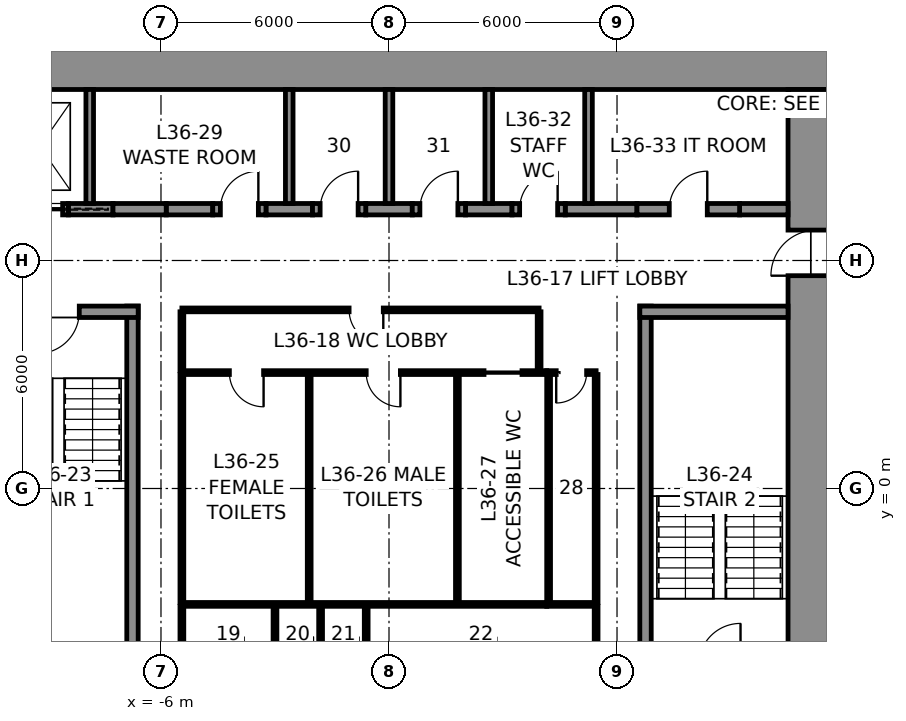
"""IFC4 building model, lengths in metres.
Left out: names, types, materials, properties, quantities, classifications, styles, units other than length and angle.
Written with IfcOpenShell. Run it as: python <this file> out.ifc"""

import sys

from ifc_helpers import new_model, si_unit, direction, frame, frame_2d, origin, place, context, subcontext, project, spatial, rectangle, extrude, element, fill, save


model = new_model("IFC4")
c1 = context("Model", 3, precision=1e-05, world=origin(), true_north=direction((0.0, 1.0)))
c2 = subcontext(c1, "Body", "Model", "MODEL_VIEW")
j1 = project(units=[si_unit("LENGTHUNIT", "METRE"), si_unit("PLANEANGLEUNIT", "RADIAN")], contexts=[c1])
p1 = place(None, origin())
s1 = spatial("IfcSite", under=j1, at=p1, CompositionType="ELEMENT")
p2 = place(p1, origin())
s2 = spatial("IfcBuilding", under=s1, at=p2, CompositionType="ELEMENT")
p3 = place(p2, frame((0.0, 0.0, 171.8)))
s3 = spatial("IfcBuildingStorey", under=s2, at=p3, CompositionType="ELEMENT", Elevation=171.8)
p4 = place(p3, frame((-12.0, 11.25, 0.0), z_axis=(0.0, 0.0, 1.0), x_axis=(1.0, 0.0, 0.0)))
e1 = element("IfcWall", 1, at=p4, inside=s3, PredefinedType="SHEAR", context=c2, shape_type="SweptSolid", body=[
    extrude(rectangle(XDim=24.0, YDim=1.5, at=frame_2d((12.0, 0.0))), origin(), (0.0, 0.0, 1.0), 4.0),
])
p5 = place(p3, frame((11.25, 10.5, 0.0), z_axis=(0.0, 0.0, 1.0), x_axis=(0.0, -1.0, 0.0)))
e2 = element("IfcWall", 2, at=p5, inside=s3, PredefinedType="SHEAR", context=c2, shape_type="SweptSolid", body=[
    extrude(rectangle(XDim=21.0, YDim=1.5, at=frame_2d((10.5, 0.0))), origin(), (0.0, 0.0, 1.0), 4.0),
])
p6 = place(p5, frame((3.7, 0.0, 0.0)))
e3 = element("IfcOpeningElement", 3, at=p6, cuts=e2, PredefinedType="OPENING", context=c2, shape_type="SweptSolid", body=[
    extrude(rectangle(XDim=1.2, YDim=2.3, at=frame_2d((0.6, 1.15))), frame((0.0, 0.76, 0.0), z_axis=(0.0, -1.0, 0.0), x_axis=(1.0, 0.0, 0.0)), (0.0, 0.0, 1.0), 1.52),
])
p7 = place(p5, frame((16.1, 0.0, 0.0)))
e4 = element("IfcOpeningElement", 4, at=p7, cuts=e2, PredefinedType="OPENING", context=c2, shape_type="SweptSolid", body=[
    extrude(rectangle(XDim=1.2, YDim=2.3, at=frame_2d((0.6, 1.15))), frame((0.0, 0.76, 0.0), z_axis=(0.0, -1.0, 0.0), x_axis=(1.0, 0.0, 0.0)), (0.0, 0.0, 1.0), 1.52),
])
p8 = place(p3, frame((-8.438, 7.35, 0.0), z_axis=(0.0, 0.0, 1.0), x_axis=(1.0, 0.0, 0.0)))
e5 = element("IfcWall", 5, at=p8, inside=s3, PredefinedType="SHEAR", context=c2, shape_type="SweptSolid", body=[
    extrude(rectangle(XDim=1.175, YDim=0.3, at=frame_2d((0.587, 0.0))), origin(), (0.0, 0.0, 1.0), 4.0),
])
for number, where, z_axis, x_axis in (
    (6, (-5.863, 7.35, 0.0), (0.0, 0.0, 1.0), (1.0, 0.0, 0.0)),
    (7, (-3.238, 7.35, 0.0), (0.0, 0.0, 1.0), (1.0, 0.0, 0.0)),
    (8, (-0.613, 7.35, 0.0), (0.0, 0.0, 1.0), (1.0, 0.0, 0.0)),
    (9, (2.012, 7.35, 0.0), (0.0, 0.0, 1.0), (1.0, 0.0, 0.0)),
):
    element("IfcWall", number, at=place(p3, frame(where, z_axis=z_axis, x_axis=x_axis)), inside=s3, PredefinedType="SHEAR", context=c2, shape_type="SweptSolid", body=[
        extrude(rectangle(XDim=1.225, YDim=0.3, at=frame_2d((0.613, 0.0))), origin(), (0.0, 0.0, 1.0), 4.0),
    ])
p9 = place(p3, frame((4.637, 7.35, 0.0), z_axis=(0.0, 0.0, 1.0), x_axis=(1.0, 0.0, 0.0)))
e10 = element("IfcWall", 10, at=p9, inside=s3, PredefinedType="SHEAR", context=c2, shape_type="SweptSolid", body=[
    extrude(rectangle(XDim=1.887, YDim=0.3, at=frame_2d((0.944, 0.0))), origin(), (0.0, 0.0, 1.0), 4.0),
])
p10 = place(p3, frame((9.225, 7.35, 0.0), z_axis=(0.0, 0.0, 1.0), x_axis=(1.0, 0.0, 0.0)))
e11 = element("IfcWall", 11, at=p10, inside=s3, PredefinedType="SHEAR", context=c2, shape_type="SweptSolid", body=[
    extrude(rectangle(XDim=1.275, YDim=0.3, at=frame_2d((0.637, 0.0))), origin(), (0.0, 0.0, 1.0), 4.0),
])
p11 = place(p3, frame((-9.938, 7.35, 0.0), z_axis=(0.0, 0.0, 1.0), x_axis=(1.0, 0.0, 0.0)))
e12 = element("IfcWall", 12, at=p11, inside=s3, PredefinedType="PARTITIONING", context=c2, shape_type="SweptSolid", body=[
    extrude(rectangle(XDim=1.5, YDim=0.3, at=frame_2d((0.75, 0.0))), origin(), (0.0, 0.0, 1.0), 4.0),
])
p12 = place(p11, frame((0.15, 0.0, 0.0)))
e13 = element("IfcOpeningElement", 13, at=p12, cuts=e12, PredefinedType="OPENING", context=c2, shape_type="SweptSolid", body=[
    extrude(rectangle(XDim=1.2, YDim=2.3, at=frame_2d((0.6, 1.15))), frame((0.0, 0.16, 0.0), z_axis=(0.0, -1.0, 0.0), x_axis=(1.0, 0.0, 0.0)), (0.0, 0.0, 1.0), 0.32),
])
p13 = place(p3, frame((-7.262, 7.35, 0.0), z_axis=(0.0, 0.0, 1.0), x_axis=(1.0, 0.0, 0.0)))
e14 = element("IfcWall", 14, at=p13, inside=s3, PredefinedType="PARTITIONING", context=c2, shape_type="SweptSolid", body=[
    extrude(rectangle(XDim=1.4, YDim=0.3, at=frame_2d((0.7, 0.0))), origin(), (0.0, 0.0, 1.0), 4.0),
])
p14 = place(p3, frame((-4.637, 7.35, 0.0), z_axis=(0.0, 0.0, 1.0), x_axis=(1.0, 0.0, 0.0)))
e15 = element("IfcWall", 15, at=p14, inside=s3, PredefinedType="PARTITIONING", context=c2, shape_type="SweptSolid", body=[
    extrude(rectangle(XDim=1.4, YDim=0.3, at=frame_2d((0.7, 0.0))), origin(), (0.0, 0.0, 1.0), 4.0),
])
p15 = place(p14, frame((0.2, 0.0, 0.0)))
e16 = element("IfcOpeningElement", 16, at=p15, cuts=e15, PredefinedType="OPENING", context=c2, shape_type="SweptSolid", body=[
    extrude(rectangle(XDim=1.0, YDim=2.3, at=frame_2d((0.5, 1.15))), frame((0.0, 0.16, 0.0), z_axis=(0.0, -1.0, 0.0), x_axis=(1.0, 0.0, 0.0)), (0.0, 0.0, 1.0), 0.32),
])
p16 = place(p3, frame((-2.012, 7.35, 0.0), z_axis=(0.0, 0.0, 1.0), x_axis=(1.0, 0.0, 0.0)))
e17 = element("IfcWall", 17, at=p16, inside=s3, PredefinedType="PARTITIONING", context=c2, shape_type="SweptSolid", body=[
    extrude(rectangle(XDim=1.4, YDim=0.3, at=frame_2d((0.7, 0.0))), origin(), (0.0, 0.0, 1.0), 4.0),
])
p17 = place(p16, frame((0.2, 0.0, 0.0)))
e18 = element("IfcOpeningElement", 18, at=p17, cuts=e17, PredefinedType="OPENING", context=c2, shape_type="SweptSolid", body=[
    extrude(rectangle(XDim=1.0, YDim=2.3, at=frame_2d((0.5, 1.15))), frame((0.0, 0.16, 0.0), z_axis=(0.0, -1.0, 0.0), x_axis=(1.0, 0.0, 0.0)), (0.0, 0.0, 1.0), 0.32),
])
p18 = place(p3, frame((0.613, 7.35, 0.0), z_axis=(0.0, 0.0, 1.0), x_axis=(1.0, 0.0, 0.0)))
e19 = element("IfcWall", 19, at=p18, inside=s3, PredefinedType="PARTITIONING", context=c2, shape_type="SweptSolid", body=[
    extrude(rectangle(XDim=1.4, YDim=0.3, at=frame_2d((0.7, 0.0))), origin(), (0.0, 0.0, 1.0), 4.0),
])
p19 = place(p18, frame((0.2, 0.0, 0.0)))
e20 = element("IfcOpeningElement", 20, at=p19, cuts=e19, PredefinedType="OPENING", context=c2, shape_type="SweptSolid", body=[
    extrude(rectangle(XDim=1.0, YDim=2.3, at=frame_2d((0.5, 1.15))), frame((0.0, 0.16, 0.0), z_axis=(0.0, -1.0, 0.0), x_axis=(1.0, 0.0, 0.0)), (0.0, 0.0, 1.0), 0.32),
])
p20 = place(p3, frame((3.238, 7.35, 0.0), z_axis=(0.0, 0.0, 1.0), x_axis=(1.0, 0.0, 0.0)))
e21 = element("IfcWall", 21, at=p20, inside=s3, PredefinedType="PARTITIONING", context=c2, shape_type="SweptSolid", body=[
    extrude(rectangle(XDim=1.4, YDim=0.3, at=frame_2d((0.7, 0.0))), origin(), (0.0, 0.0, 1.0), 4.0),
])
p21 = place(p20, frame((0.2, 0.0, 0.0)))
e22 = element("IfcOpeningElement", 22, at=p21, cuts=e21, PredefinedType="OPENING", context=c2, shape_type="SweptSolid", body=[
    extrude(rectangle(XDim=1.0, YDim=2.3, at=frame_2d((0.5, 1.15))), frame((0.0, 0.16, 0.0), z_axis=(0.0, -1.0, 0.0), x_axis=(1.0, 0.0, 0.0)), (0.0, 0.0, 1.0), 0.32),
])
p22 = place(p3, frame((6.525, 7.35, 0.0), z_axis=(0.0, 0.0, 1.0), x_axis=(1.0, 0.0, 0.0)))
e23 = element("IfcWall", 23, at=p22, inside=s3, PredefinedType="PARTITIONING", context=c2, shape_type="SweptSolid", body=[
    extrude(rectangle(XDim=2.7, YDim=0.3, at=frame_2d((1.35, 0.0))), origin(), (0.0, 0.0, 1.0), 4.0),
])
p23 = place(p22, frame((0.85, 0.0, 0.0)))
e24 = element("IfcOpeningElement", 24, at=p23, cuts=e23, PredefinedType="OPENING", context=c2, shape_type="SweptSolid", body=[
    extrude(rectangle(XDim=1.0, YDim=2.3, at=frame_2d((0.5, 1.15))), frame((0.0, 0.16, 0.0), z_axis=(0.0, -1.0, 0.0), x_axis=(1.0, 0.0, 0.0)), (0.0, 0.0, 1.0), 0.32),
])
for number, where, z_axis, x_axis in (
    (25, (-7.875, 7.5, 0.0), (0.0, 0.0, 1.0), (0.0, 1.0, 0.0)),
    (26, (-2.625, 7.5, 0.0), (0.0, 0.0, 1.0), (0.0, 1.0, 0.0)),
    (27, (0.0, 7.5, 0.0), (0.0, 0.0, 1.0), (0.0, 1.0, 0.0)),
    (28, (2.625, 7.5, 0.0), (0.0, 0.0, 1.0), (0.0, 1.0, 0.0)),
    (29, (5.25, 7.5, 0.0), (0.0, 0.0, 1.0), (0.0, 1.0, 0.0)),
):
    element("IfcWall", number, at=place(p3, frame(where, z_axis=z_axis, x_axis=x_axis)), inside=s3, PredefinedType="PARTITIONING", context=c2, shape_type="SweptSolid", body=[
        extrude(rectangle(XDim=3.0, YDim=0.2, at=frame_2d((1.5, 0.0))), origin(), (0.0, 0.0, 1.0), 4.0),
    ])
p24 = place(p3, frame((-6.75, -4.8, 0.0), z_axis=(0.0, 0.0, 1.0), x_axis=(0.0, 1.0, 0.0)))
e30 = element("IfcWall", 30, at=p24, inside=s3, PredefinedType="SOLIDWALL", context=c2, shape_type="SweptSolid", body=[
    extrude(rectangle(XDim=9.6, YDim=0.3, at=frame_2d((4.8, 0.0))), origin(), (0.0, 0.0, 1.0), 3.75),
])
p25 = place(p3, frame((-10.5, 4.65, 0.0), z_axis=(0.0, 0.0, 1.0), x_axis=(1.0, 0.0, 0.0)))
e31 = element("IfcWall", 31, at=p25, inside=s3, PredefinedType="SOLIDWALL", context=c2, shape_type="SweptSolid", body=[
    extrude(rectangle(XDim=3.9, YDim=0.3, at=frame_2d((1.95, 0.0))), origin(), (0.0, 0.0, 1.0), 3.75),
])
p26 = place(p25, frame((1.25, 0.0, 0.0)))
e32 = element("IfcOpeningElement", 32, at=p26, cuts=e31, PredefinedType="OPENING", context=c2, shape_type="SweptSolid", body=[
    extrude(rectangle(XDim=1.1, YDim=2.3, at=frame_2d((0.55, 1.15))), frame((0.0, 0.16, 0.0), z_axis=(0.0, -1.0, 0.0), x_axis=(1.0, 0.0, 0.0)), (0.0, 0.0, 1.0), 0.32),
])
p27 = place(p3, frame((6.75, -4.8, 0.0), z_axis=(0.0, 0.0, 1.0), x_axis=(0.0, 1.0, 0.0)))
e33 = element("IfcWall", 33, at=p27, inside=s3, PredefinedType="SOLIDWALL", context=c2, shape_type="SweptSolid", body=[
    extrude(rectangle(XDim=9.6, YDim=0.3, at=frame_2d((4.8, 0.0))), origin(), (0.0, 0.0, 1.0), 3.75),
])
p28 = place(p3, frame((6.6, 4.65, 0.0), z_axis=(0.0, 0.0, 1.0), x_axis=(1.0, 0.0, 0.0)))
e34 = element("IfcWall", 34, at=p28, inside=s3, PredefinedType="SOLIDWALL", context=c2, shape_type="SweptSolid", body=[
    extrude(rectangle(XDim=3.9, YDim=0.3, at=frame_2d((1.95, 0.0))), origin(), (0.0, 0.0, 1.0), 3.75),
])
p29 = place(p3, frame((-5.45, 3.05, 0.0), z_axis=(0.0, 0.0, 1.0), x_axis=(1.0, 0.0, 0.0)))
e35 = element("IfcWall", 35, at=p29, inside=s3, PredefinedType="PARTITIONING", context=c2, shape_type="SweptSolid", body=[
    extrude(rectangle(XDim=9.6, YDim=0.1, at=frame_2d((4.8, 0.0))), origin(), (0.0, 0.0, 1.0), 3.75),
])
p30 = place(p29, frame((1.25, 0.0, 0.0)))
e36 = element("IfcOpeningElement", 36, at=p30, cuts=e35, PredefinedType="OPENING", context=c2, shape_type="SweptSolid", body=[
    extrude(rectangle(XDim=0.9, YDim=2.3, at=frame_2d((0.45, 1.15))), frame((0.0, 0.06, 0.0), z_axis=(0.0, -1.0, 0.0), x_axis=(1.0, 0.0, 0.0)), (0.0, 0.0, 1.0), 0.12),
])
p31 = place(p29, frame((4.85, 0.0, 0.0)))
e37 = element("IfcOpeningElement", 37, at=p31, cuts=e35, PredefinedType="OPENING", context=c2, shape_type="SweptSolid", body=[
    extrude(rectangle(XDim=0.9, YDim=2.3, at=frame_2d((0.45, 1.15))), frame((0.0, 0.06, 0.0), z_axis=(0.0, -1.0, 0.0), x_axis=(1.0, 0.0, 0.0)), (0.0, 0.0, 1.0), 0.12),
])
p32 = place(p29, frame((7.95, 0.0, 0.0)))
e38 = element("IfcOpeningElement", 38, at=p32, cuts=e35, PredefinedType="OPENING", context=c2, shape_type="SweptSolid", body=[
    extrude(rectangle(XDim=1.0, YDim=2.3, at=frame_2d((0.5, 1.15))), frame((0.0, 0.06, 0.0), z_axis=(0.0, -1.0, 0.0), x_axis=(1.0, 0.0, 0.0)), (0.0, 0.0, 1.0), 0.12),
])
p33 = place(p3, frame((4.15, 3.05, 0.0), z_axis=(0.0, 0.0, 1.0), x_axis=(1.0, 0.0, 0.0)))
e39 = element("IfcWall", 39, at=p33, inside=s3, PredefinedType="PARTITIONING", context=c2, shape_type="SweptSolid", body=[
    extrude(rectangle(XDim=1.3, YDim=0.1, at=frame_2d((0.65, 0.0))), origin(), (0.0, 0.0, 1.0), 3.75),
])
p34 = place(p33, frame((0.25, 0.0, 0.0)))
e40 = element("IfcOpeningElement", 40, at=p34, cuts=e39, PredefinedType="OPENING", context=c2, shape_type="SweptSolid", body=[
    extrude(rectangle(XDim=0.8, YDim=2.3, at=frame_2d((0.4, 1.15))), frame((0.0, 0.06, 0.0), z_axis=(0.0, -1.0, 0.0), x_axis=(1.0, 0.0, 0.0)), (0.0, 0.0, 1.0), 0.12),
])
p35 = place(p3, frame((4.15, -3.05, 0.0), z_axis=(0.0, 0.0, 1.0), x_axis=(-1.0, 0.0, 0.0)))
e41 = element("IfcWall", 41, at=p35, inside=s3, PredefinedType="PARTITIONING", context=c2, shape_type="SweptSolid", body=[
    extrude(rectangle(XDim=9.6, YDim=0.1, at=frame_2d((4.8, 0.0))), origin(), (0.0, 0.0, 1.0), 3.75),
])
p36 = place(p3, frame((5.45, -3.05, 0.0), z_axis=(0.0, 0.0, 1.0), x_axis=(-1.0, 0.0, 0.0)))
e42 = element("IfcWall", 42, at=p36, inside=s3, PredefinedType="PARTITIONING", context=c2, shape_type="SweptSolid", body=[
    extrude(rectangle(XDim=1.3, YDim=0.1, at=frame_2d((0.65, 0.0))), origin(), (0.0, 0.0, 1.0), 3.75),
])
for number, where, z_axis, x_axis in (
    (43, (5.45, 3.0, 0.0), (0.0, 0.0, 1.0), (0.0, -1.0, 0.0)),
    (44, (-5.45, -3.0, 0.0), (0.0, 0.0, 1.0), (0.0, 1.0, 0.0)),
    (45, (-2.1, -3.0, 0.0), (0.0, 0.0, 1.0), (0.0, 1.0, 0.0)),
    (46, (1.8, -3.0, 0.0), (0.0, 0.0, 1.0), (0.0, 1.0, 0.0)),
    (47, (4.2, -3.0, 0.0), (0.0, 0.0, 1.0), (0.0, 1.0, 0.0)),
):
    element("IfcWall", number, at=place(p3, frame(where, z_axis=z_axis, x_axis=x_axis)), inside=s3, PredefinedType="PARTITIONING", context=c2, shape_type="SweptSolid", body=[
        extrude(rectangle(XDim=6.0, YDim=0.1, at=frame_2d((3.0, 0.0))), origin(), (0.0, 0.0, 1.0), 3.75),
    ])
p37 = place(p3, frame((-5.45, 4.7, 0.0), z_axis=(0.0, 0.0, 1.0), x_axis=(1.0, 0.0, 0.0)))
e48 = element("IfcWall", 48, at=p37, inside=s3, PredefinedType="PARTITIONING", context=c2, shape_type="SweptSolid", body=[
    extrude(rectangle(XDim=9.4, YDim=0.1, at=frame_2d((4.7, 0.0))), origin(), (0.0, 0.0, 1.0), 3.75),
])
p38 = place(p37, frame((4.4, 0.0, 0.0)))
e49 = element("IfcOpeningElement", 49, at=p38, cuts=e48, PredefinedType="OPENING", context=c2, shape_type="SweptSolid", body=[
    extrude(rectangle(XDim=0.9, YDim=2.3, at=frame_2d((0.45, 1.15))), frame((0.0, 0.06, 0.0), z_axis=(0.0, -1.0, 0.0), x_axis=(1.0, 0.0, 0.0)), (0.0, 0.0, 1.0), 0.12),
])
for number, where, z_axis, x_axis in (
    (50, (-5.45, 3.1, 0.0), (0.0, 0.0, 1.0), (0.0, 1.0, 0.0)),
    (51, (3.95, 3.1, 0.0), (0.0, 0.0, 1.0), (0.0, 1.0, 0.0)),
    (52, (-5.45, -3.1, 0.0), (0.0, 0.0, 1.0), (0.0, -1.0, 0.0)),
    (53, (5.45, -3.1, 0.0), (0.0, 0.0, 1.0), (0.0, -1.0, 0.0)),
    (54, (-3.0, -3.1, 0.0), (0.0, 0.0, 1.0), (0.0, -1.0, 0.0)),
    (55, (-1.8, -3.1, 0.0), (0.0, 0.0, 1.0), (0.0, -1.0, 0.0)),
    (56, (-0.6, -3.1, 0.0), (0.0, 0.0, 1.0), (0.0, -1.0, 0.0)),
):
    element("IfcWall", number, at=place(p3, frame(where, z_axis=z_axis, x_axis=x_axis)), inside=s3, PredefinedType="PARTITIONING", context=c2, shape_type="SweptSolid", body=[
        extrude(rectangle(XDim=1.55, YDim=0.1, at=frame_2d((0.775, 0.0))), origin(), (0.0, 0.0, 1.0), 3.75),
    ])
p39 = place(p26, frame((1.1, 0.0, 0.0), z_axis=(0.0, 0.0, 1.0), x_axis=(-1.0, 0.0, 0.0)))
e57 = element("IfcDoor", 57, at=p39, inside=s3, OperationType="SINGLE_SWING_RIGHT", PredefinedType="DOOR", context=c2, shape_type="SweptSolid", body=[
    extrude(rectangle(XDim=1.1, YDim=2.3, at=frame_2d((0.55, 1.15))), frame((0.0, 0.025, 0.0), z_axis=(0.0, -1.0, 0.0), x_axis=(1.0, 0.0, 0.0)), (0.0, 0.0, 1.0), 0.05),
])
fill(e32, e57)
p40 = place(p30, frame((0.9, 0.0, 0.0), z_axis=(0.0, 0.0, 1.0), x_axis=(-1.0, 0.0, 0.0)))
e58 = element("IfcDoor", 58, at=p40, inside=s3, OperationType="SINGLE_SWING_LEFT", PredefinedType="DOOR", context=c2, shape_type="SweptSolid", body=[
    extrude(rectangle(XDim=0.9, YDim=2.3, at=frame_2d((0.45, 1.15))), frame((0.0, 0.025, 0.0), z_axis=(0.0, -1.0, 0.0), x_axis=(1.0, 0.0, 0.0)), (0.0, 0.0, 1.0), 0.05),
])
fill(e36, e58)
p41 = place(p31, frame((0.9, 0.0, 0.0), z_axis=(0.0, 0.0, 1.0), x_axis=(-1.0, 0.0, 0.0)))
e59 = element("IfcDoor", 59, at=p41, inside=s3, OperationType="SINGLE_SWING_LEFT", PredefinedType="DOOR", context=c2, shape_type="SweptSolid", body=[
    extrude(rectangle(XDim=0.9, YDim=2.3, at=frame_2d((0.45, 1.15))), frame((0.0, 0.025, 0.0), z_axis=(0.0, -1.0, 0.0), x_axis=(1.0, 0.0, 0.0)), (0.0, 0.0, 1.0), 0.05),
])
fill(e37, e59)
p42 = place(p32, frame((1.0, 0.0, 0.0), z_axis=(0.0, 0.0, 1.0), x_axis=(-1.0, 0.0, 0.0)))
e60 = element("IfcDoor", 60, at=p42, inside=s3, OperationType="SLIDING_TO_LEFT", PredefinedType="DOOR", context=c2, shape_type="SweptSolid", body=[
    extrude(rectangle(XDim=1.0, YDim=2.3, at=frame_2d((0.5, 1.15))), frame((0.0, 0.025, 0.0), z_axis=(0.0, -1.0, 0.0), x_axis=(1.0, 0.0, 0.0)), (0.0, 0.0, 1.0), 0.05),
])
fill(e38, e60)
p43 = place(p34, frame((0.8, 0.0, 0.0), z_axis=(0.0, 0.0, 1.0), x_axis=(-1.0, 0.0, 0.0)))
e61 = element("IfcDoor", 61, at=p43, inside=s3, OperationType="SINGLE_SWING_RIGHT", PredefinedType="DOOR", context=c2, shape_type="SweptSolid", body=[
    extrude(rectangle(XDim=0.8, YDim=2.3, at=frame_2d((0.4, 1.15))), frame((0.0, 0.025, 0.0), z_axis=(0.0, -1.0, 0.0), x_axis=(1.0, 0.0, 0.0)), (0.0, 0.0, 1.0), 0.05),
])
fill(e40, e61)
p44 = place(p38, frame((0.9, 0.0, 0.0), z_axis=(0.0, 0.0, 1.0), x_axis=(-1.0, 0.0, 0.0)))
e62 = element("IfcDoor", 62, at=p44, inside=s3, OperationType="SINGLE_SWING_LEFT", PredefinedType="DOOR", context=c2, shape_type="SweptSolid", body=[
    extrude(rectangle(XDim=0.9, YDim=2.3, at=frame_2d((0.45, 1.15))), frame((0.0, 0.025, 0.0), z_axis=(0.0, -1.0, 0.0), x_axis=(1.0, 0.0, 0.0)), (0.0, 0.0, 1.0), 0.05),
])
fill(e49, e62)
p45 = place(p15, origin())
e63 = element("IfcDoor", 63, at=p45, inside=s3, OperationType="SINGLE_SWING_RIGHT", PredefinedType="DOOR", context=c2, shape_type="SweptSolid", body=[
    extrude(rectangle(XDim=1.0, YDim=2.3, at=frame_2d((0.5, 1.15))), frame((0.0, 0.025, 0.0), z_axis=(0.0, -1.0, 0.0), x_axis=(1.0, 0.0, 0.0)), (0.0, 0.0, 1.0), 0.05),
])
fill(e16, e63)
p46 = place(p17, origin())
e64 = element("IfcDoor", 64, at=p46, inside=s3, OperationType="SINGLE_SWING_RIGHT", PredefinedType="DOOR", context=c2, shape_type="SweptSolid", body=[
    extrude(rectangle(XDim=1.0, YDim=2.3, at=frame_2d((0.5, 1.15))), frame((0.0, 0.025, 0.0), z_axis=(0.0, -1.0, 0.0), x_axis=(1.0, 0.0, 0.0)), (0.0, 0.0, 1.0), 0.05),
])
fill(e18, e64)
p47 = place(p19, origin())
e65 = element("IfcDoor", 65, at=p47, inside=s3, OperationType="SINGLE_SWING_RIGHT", PredefinedType="DOOR", context=c2, shape_type="SweptSolid", body=[
    extrude(rectangle(XDim=1.0, YDim=2.3, at=frame_2d((0.5, 1.15))), frame((0.0, 0.025, 0.0), z_axis=(0.0, -1.0, 0.0), x_axis=(1.0, 0.0, 0.0)), (0.0, 0.0, 1.0), 0.05),
])
fill(e20, e65)
p48 = place(p21, origin())
e66 = element("IfcDoor", 66, at=p48, inside=s3, OperationType="SINGLE_SWING_RIGHT", PredefinedType="DOOR", context=c2, shape_type="SweptSolid", body=[
    extrude(rectangle(XDim=1.0, YDim=2.3, at=frame_2d((0.5, 1.15))), frame((0.0, 0.025, 0.0), z_axis=(0.0, -1.0, 0.0), x_axis=(1.0, 0.0, 0.0)), (0.0, 0.0, 1.0), 0.05),
])
fill(e22, e66)
p49 = place(p23, origin())
e67 = element("IfcDoor", 67, at=p49, inside=s3, OperationType="SINGLE_SWING_RIGHT", PredefinedType="DOOR", context=c2, shape_type="SweptSolid", body=[
    extrude(rectangle(XDim=1.0, YDim=2.3, at=frame_2d((0.5, 1.15))), frame((0.0, 0.025, 0.0), z_axis=(0.0, -1.0, 0.0), x_axis=(1.0, 0.0, 0.0)), (0.0, 0.0, 1.0), 0.05),
])
fill(e24, e67)
p50 = place(p6, frame((1.2, 0.0, 0.0), z_axis=(0.0, 0.0, 1.0), x_axis=(-1.0, 0.0, 0.0)))
e68 = element("IfcDoor", 68, at=p50, inside=s3, OperationType="SINGLE_SWING_LEFT", PredefinedType="DOOR", context=c2, shape_type="SweptSolid", body=[
    extrude(rectangle(XDim=1.2, YDim=2.3, at=frame_2d((0.6, 1.15))), frame((0.0, 0.025, 0.0), z_axis=(0.0, -1.0, 0.0), x_axis=(1.0, 0.0, 0.0)), (0.0, 0.0, 1.0), 0.05),
])
fill(e3, e68)
p51 = place(p12, frame((1.2, 0.0, 0.0), z_axis=(0.0, 0.0, 1.0), x_axis=(-1.0, 0.0, 0.0)))
e69 = element("IfcDoor", 69, at=p51, inside=s3, OperationType="SLIDING_TO_LEFT", PredefinedType="DOOR", context=c2, shape_type="SweptSolid", body=[
    extrude(rectangle(XDim=1.2, YDim=2.3, at=frame_2d((0.6, 1.15))), frame((0.0, 0.025, 0.0), z_axis=(0.0, -1.0, 0.0), x_axis=(1.0, 0.0, 0.0)), (0.0, 0.0, 1.0), 0.05),
])
fill(e13, e69)
save(model, sys.argv[1])
